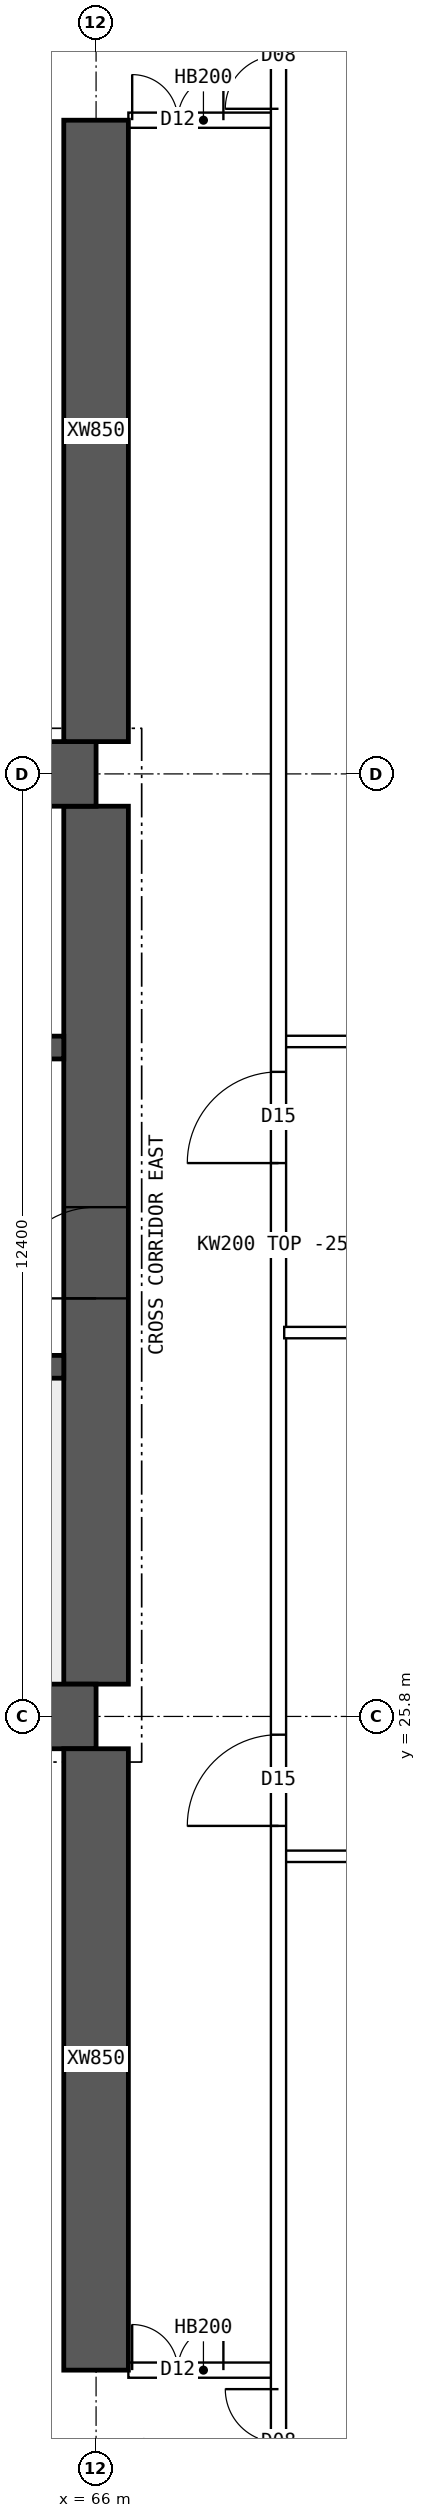
"""IFC4 building model, lengths in metres.
Left out: names, types, materials, properties, quantities, classifications, styles, units other than length and angle.
Written with IfcOpenShell. Run it as: python <this file> out.ifc"""

import sys

from ifc_helpers import new_model, si_unit, direction, frame, frame_2d, origin, place, context, subcontext, project, spatial, polyline, rectangle, outline, extrude, element, fill, save


model = new_model("IFC4")
c1 = context("Model", 3, precision=1e-05, world=origin(), true_north=direction((0.0, 1.0)))
c2 = subcontext(c1, "Body", "Model", "MODEL_VIEW")
j1 = project(units=[si_unit("LENGTHUNIT", "METRE"), si_unit("PLANEANGLEUNIT", "RADIAN")], contexts=[c1])
p1 = place(None, origin())
s1 = spatial("IfcSite", under=j1, at=p1, CompositionType="ELEMENT")
p2 = place(p1, origin())
s2 = spatial("IfcBuilding", under=s1, at=p2, CompositionType="ELEMENT")
p3 = place(p2, frame((0.0, 0.0, 171.1)))
s3 = spatial("IfcBuildingStorey", under=s2, at=p3, CompositionType="ELEMENT", Elevation=171.1)
for number, where, z_axis, x_axis in (
    (1, (18.0, 25.8, 0.0), (0.0, 0.0, 1.0), (1.0, 0.0, 0.0)),
    (2, (18.0, 38.2, 0.0), (0.0, 0.0, 1.0), (1.0, 0.0, 0.0)),
):
    element("IfcWall", number, at=place(p3, frame(where, z_axis=z_axis, x_axis=x_axis)), inside=s3, PredefinedType="SHEAR", context=c2, shape_type="SweptSolid", body=[
        extrude(rectangle(XDim=48.0, YDim=0.85, at=frame_2d((24.0, 0.0))), origin(), (0.0, 0.0, 1.0), 3.75),
    ])
p4 = place(p3, frame((66.0, 26.225, 0.0), z_axis=(0.0, 0.0, 1.0), x_axis=(0.0, 1.0, 0.0)))
e3 = element("IfcWall", 3, at=p4, inside=s3, PredefinedType="SHEAR", context=c2, shape_type="SweptSolid", body=[
    extrude(rectangle(XDim=11.55, YDim=0.85, at=frame_2d((5.775, 0.0))), origin(), (0.0, 0.0, 1.0), 3.75),
])
p5 = place(p4, frame((5.075, 0.0, 0.0)))
e4 = element("IfcOpeningElement", 4, at=p5, cuts=e3, PredefinedType="OPENING", context=c2, shape_type="SweptSolid", body=[
    extrude(rectangle(XDim=1.2, YDim=2.1, at=frame_2d((0.6, 1.05))), frame((0.0, 0.435, 0.0), z_axis=(0.0, -1.0, 0.0), x_axis=(1.0, 0.0, 0.0)), (0.0, 0.0, 1.0), 0.87),
])
p6 = place(p3, frame((18.425, 30.4, 0.0), z_axis=(0.0, 0.0, 1.0), x_axis=(1.0, 0.0, 0.0)))
e5 = element("IfcWall", 5, at=p6, inside=s3, PredefinedType="SHEAR", context=c2, shape_type="SweptSolid", body=[
    extrude(rectangle(XDim=47.15, YDim=0.3, at=frame_2d((23.575, 0.0))), origin(), (0.0, 0.0, 1.0), 3.75),
])
p7 = place(p6, frame((0.4, 0.0, 0.0)))
e6 = element("IfcOpeningElement", 6, at=p7, cuts=e5, PredefinedType="OPENING", context=c2, shape_type="SweptSolid", body=[
    extrude(rectangle(XDim=1.0, YDim=2.1, at=frame_2d((0.5, 1.05))), frame((0.0, 0.16, 0.0), z_axis=(0.0, -1.0, 0.0), x_axis=(1.0, 0.0, 0.0)), (0.0, 0.0, 1.0), 0.32),
])
p8 = place(p6, frame((45.75, 0.0, 0.0)))
e7 = element("IfcOpeningElement", 7, at=p8, cuts=e5, PredefinedType="OPENING", context=c2, shape_type="SweptSolid", body=[
    extrude(rectangle(XDim=1.0, YDim=2.1, at=frame_2d((0.5, 1.05))), frame((0.0, 0.16, 0.0), z_axis=(0.0, -1.0, 0.0), x_axis=(1.0, 0.0, 0.0)), (0.0, 0.0, 1.0), 0.32),
])
p9 = place(p6, frame((8.325, 0.0, 0.0)))
e8 = element("IfcOpeningElement", 8, at=p9, cuts=e5, PredefinedType="OPENING", context=c2, shape_type="SweptSolid", body=[
    extrude(rectangle(XDim=1.1, YDim=2.1, at=frame_2d((0.55, 1.05))), frame((0.0, 0.16, 0.0), z_axis=(0.0, -1.0, 0.0), x_axis=(1.0, 0.0, 0.0)), (0.0, 0.0, 1.0), 0.32),
])
p10 = place(p6, frame((10.925, 0.0, 0.0)))
e9 = element("IfcOpeningElement", 9, at=p10, cuts=e5, PredefinedType="OPENING", context=c2, shape_type="SweptSolid", body=[
    extrude(rectangle(XDim=1.1, YDim=2.1, at=frame_2d((0.55, 1.05))), frame((0.0, 0.16, 0.0), z_axis=(0.0, -1.0, 0.0), x_axis=(1.0, 0.0, 0.0)), (0.0, 0.0, 1.0), 0.32),
])
p11 = place(p6, frame((13.525, 0.0, 0.0)))
e10 = element("IfcOpeningElement", 10, at=p11, cuts=e5, PredefinedType="OPENING", context=c2, shape_type="SweptSolid", body=[
    extrude(rectangle(XDim=1.1, YDim=2.1, at=frame_2d((0.55, 1.05))), frame((0.0, 0.16, 0.0), z_axis=(0.0, -1.0, 0.0), x_axis=(1.0, 0.0, 0.0)), (0.0, 0.0, 1.0), 0.32),
])
p12 = place(p6, frame((16.125, 0.0, 0.0)))
e11 = element("IfcOpeningElement", 11, at=p12, cuts=e5, PredefinedType="OPENING", context=c2, shape_type="SweptSolid", body=[
    extrude(rectangle(XDim=1.1, YDim=2.1, at=frame_2d((0.55, 1.05))), frame((0.0, 0.16, 0.0), z_axis=(0.0, -1.0, 0.0), x_axis=(1.0, 0.0, 0.0)), (0.0, 0.0, 1.0), 0.32),
])
p13 = place(p6, frame((18.9, 0.0, 0.0)))
e12 = element("IfcOpeningElement", 12, at=p13, cuts=e5, PredefinedType="OPENING", context=c2, shape_type="SweptSolid", body=[
    extrude(rectangle(XDim=0.9, YDim=2.1, at=frame_2d((0.45, 1.05))), frame((0.0, 0.16, 0.0), z_axis=(0.0, -1.0, 0.0), x_axis=(1.0, 0.0, 0.0)), (0.0, 0.0, 1.0), 0.32),
])
p14 = place(p6, frame((30.192, 0.0, 0.0)))
e13 = element("IfcOpeningElement", 13, at=p14, cuts=e5, PredefinedType="OPENING", context=c2, shape_type="SweptSolid", body=[
    extrude(rectangle(XDim=1.1, YDim=2.1, at=frame_2d((0.55, 1.05))), frame((0.0, 0.16, 0.0), z_axis=(0.0, -1.0, 0.0), x_axis=(1.0, 0.0, 0.0)), (0.0, 0.0, 1.0), 0.32),
])
p15 = place(p6, frame((33.725, 0.0, 0.0)))
e14 = element("IfcOpeningElement", 14, at=p15, cuts=e5, PredefinedType="OPENING", context=c2, shape_type="SweptSolid", body=[
    extrude(rectangle(XDim=1.1, YDim=2.1, at=frame_2d((0.55, 1.05))), frame((0.0, 0.16, 0.0), z_axis=(0.0, -1.0, 0.0), x_axis=(1.0, 0.0, 0.0)), (0.0, 0.0, 1.0), 0.32),
])
p16 = place(p6, frame((37.258, 0.0, 0.0)))
e15 = element("IfcOpeningElement", 15, at=p16, cuts=e5, PredefinedType="OPENING", context=c2, shape_type="SweptSolid", body=[
    extrude(rectangle(XDim=1.1, YDim=2.1, at=frame_2d((0.55, 1.05))), frame((0.0, 0.16, 0.0), z_axis=(0.0, -1.0, 0.0), x_axis=(1.0, 0.0, 0.0)), (0.0, 0.0, 1.0), 0.32),
])
p17 = place(p3, frame((18.425, 34.6, 0.0), z_axis=(0.0, 0.0, 1.0), x_axis=(1.0, 0.0, 0.0)))
e16 = element("IfcWall", 16, at=p17, inside=s3, PredefinedType="SHEAR", context=c2, shape_type="SweptSolid", body=[
    extrude(rectangle(XDim=47.15, YDim=0.3, at=frame_2d((23.575, 0.0))), origin(), (0.0, 0.0, 1.0), 3.75),
])
p18 = place(p17, frame((0.9, 0.0, 0.0)))
e17 = element("IfcOpeningElement", 17, at=p18, cuts=e16, PredefinedType="OPENING", context=c2, shape_type="SweptSolid", body=[
    extrude(rectangle(XDim=1.1, YDim=2.1, at=frame_2d((0.55, 1.05))), frame((0.0, 0.16, 0.0), z_axis=(0.0, -1.0, 0.0), x_axis=(1.0, 0.0, 0.0)), (0.0, 0.0, 1.0), 0.32),
])
p19 = place(p17, frame((45.15, 0.0, 0.0)))
e18 = element("IfcOpeningElement", 18, at=p19, cuts=e16, PredefinedType="OPENING", context=c2, shape_type="SweptSolid", body=[
    extrude(rectangle(XDim=1.1, YDim=2.1, at=frame_2d((0.55, 1.05))), frame((0.0, 0.16, 0.0), z_axis=(0.0, -1.0, 0.0), x_axis=(1.0, 0.0, 0.0)), (0.0, 0.0, 1.0), 0.32),
])
p20 = place(p17, frame((4.175, 0.0, 0.0)))
e19 = element("IfcOpeningElement", 19, at=p20, cuts=e16, PredefinedType="OPENING", context=c2, shape_type="SweptSolid", body=[
    extrude(rectangle(XDim=0.9, YDim=2.1, at=frame_2d((0.45, 1.05))), frame((0.0, 0.16, 0.0), z_axis=(0.0, -1.0, 0.0), x_axis=(1.0, 0.0, 0.0)), (0.0, 0.0, 1.0), 0.32),
])
p21 = place(p17, frame((42.075, 0.0, 0.0)))
e20 = element("IfcOpeningElement", 20, at=p21, cuts=e16, PredefinedType="OPENING", context=c2, shape_type="SweptSolid", body=[
    extrude(rectangle(XDim=0.9, YDim=2.1, at=frame_2d((0.45, 1.05))), frame((0.0, 0.16, 0.0), z_axis=(0.0, -1.0, 0.0), x_axis=(1.0, 0.0, 0.0)), (0.0, 0.0, 1.0), 0.32),
])
p22 = place(p17, frame((8.95, 0.0, 0.0)))
e21 = element("IfcOpeningElement", 21, at=p22, cuts=e16, PredefinedType="OPENING", context=c2, shape_type="SweptSolid", body=[
    extrude(rectangle(XDim=0.9, YDim=2.1, at=frame_2d((0.45, 1.05))), frame((0.0, 0.16, 0.0), z_axis=(0.0, -1.0, 0.0), x_axis=(1.0, 0.0, 0.0)), (0.0, 0.0, 1.0), 0.32),
])
p23 = place(p17, frame((12.924, 0.0, 0.0)))
e22 = element("IfcOpeningElement", 22, at=p23, cuts=e16, PredefinedType="OPENING", context=c2, shape_type="SweptSolid", body=[
    extrude(rectangle(XDim=0.9, YDim=2.1, at=frame_2d((0.45, 1.05))), frame((0.0, 0.16, 0.0), z_axis=(0.0, -1.0, 0.0), x_axis=(1.0, 0.0, 0.0)), (0.0, 0.0, 1.0), 0.32),
])
p24 = place(p17, frame((16.571, 0.0, 0.0)))
e23 = element("IfcOpeningElement", 23, at=p24, cuts=e16, PredefinedType="OPENING", context=c2, shape_type="SweptSolid", body=[
    extrude(rectangle(XDim=0.9, YDim=2.1, at=frame_2d((0.45, 1.05))), frame((0.0, 0.16, 0.0), z_axis=(0.0, -1.0, 0.0), x_axis=(1.0, 0.0, 0.0)), (0.0, 0.0, 1.0), 0.32),
])
p25 = place(p17, frame((20.33, 0.0, 0.0)))
e24 = element("IfcOpeningElement", 24, at=p25, cuts=e16, PredefinedType="OPENING", context=c2, shape_type="SweptSolid", body=[
    extrude(rectangle(XDim=0.9, YDim=2.1, at=frame_2d((0.45, 1.05))), frame((0.0, 0.16, 0.0), z_axis=(0.0, -1.0, 0.0), x_axis=(1.0, 0.0, 0.0)), (0.0, 0.0, 1.0), 0.32),
])
p26 = place(p17, frame((24.736, 0.0, 0.0)))
e25 = element("IfcOpeningElement", 25, at=p26, cuts=e16, PredefinedType="OPENING", context=c2, shape_type="SweptSolid", body=[
    extrude(rectangle(XDim=0.9, YDim=2.1, at=frame_2d((0.45, 1.05))), frame((0.0, 0.16, 0.0), z_axis=(0.0, -1.0, 0.0), x_axis=(1.0, 0.0, 0.0)), (0.0, 0.0, 1.0), 0.32),
])
p27 = place(p17, frame((27.533, 0.0, 0.0)))
e26 = element("IfcOpeningElement", 26, at=p27, cuts=e16, PredefinedType="OPENING", context=c2, shape_type="SweptSolid", body=[
    extrude(rectangle(XDim=0.9, YDim=2.1, at=frame_2d((0.45, 1.05))), frame((0.0, 0.16, 0.0), z_axis=(0.0, -1.0, 0.0), x_axis=(1.0, 0.0, 0.0)), (0.0, 0.0, 1.0), 0.32),
])
p28 = place(p17, frame((29.5, 0.0, 0.0)))
e27 = element("IfcOpeningElement", 27, at=p28, cuts=e16, PredefinedType="OPENING", context=c2, shape_type="SweptSolid", body=[
    extrude(rectangle(XDim=0.9, YDim=2.1, at=frame_2d((0.45, 1.05))), frame((0.0, 0.16, 0.0), z_axis=(0.0, -1.0, 0.0), x_axis=(1.0, 0.0, 0.0)), (0.0, 0.0, 1.0), 0.32),
])
p29 = place(p17, frame((31.932, 0.0, 0.0)))
e28 = element("IfcOpeningElement", 28, at=p29, cuts=e16, PredefinedType="OPENING", context=c2, shape_type="SweptSolid", body=[
    extrude(rectangle(XDim=0.9, YDim=2.1, at=frame_2d((0.45, 1.05))), frame((0.0, 0.16, 0.0), z_axis=(0.0, -1.0, 0.0), x_axis=(1.0, 0.0, 0.0)), (0.0, 0.0, 1.0), 0.32),
])
p30 = place(p17, frame((34.667, 0.0, 0.0)))
e29 = element("IfcOpeningElement", 29, at=p30, cuts=e16, PredefinedType="OPENING", context=c2, shape_type="SweptSolid", body=[
    extrude(rectangle(XDim=0.9, YDim=2.1, at=frame_2d((0.45, 1.05))), frame((0.0, 0.16, 0.0), z_axis=(0.0, -1.0, 0.0), x_axis=(1.0, 0.0, 0.0)), (0.0, 0.0, 1.0), 0.32),
])
p31 = place(p17, frame((37.707, 0.0, 0.0)))
e30 = element("IfcOpeningElement", 30, at=p31, cuts=e16, PredefinedType="OPENING", context=c2, shape_type="SweptSolid", body=[
    extrude(rectangle(XDim=0.9, YDim=2.1, at=frame_2d((0.45, 1.05))), frame((0.0, 0.16, 0.0), z_axis=(0.0, -1.0, 0.0), x_axis=(1.0, 0.0, 0.0)), (0.0, 0.0, 1.0), 0.32),
])
for number, where, z_axis, x_axis in (
    (31, (66.0, 17.2, 0.0), (0.0, 0.0, 1.0), (0.0, 1.0, 0.0)),
    (32, (66.0, 38.625, 0.0), (0.0, 0.0, 1.0), (0.0, 1.0, 0.0)),
):
    element("IfcWall", number, at=place(p3, frame(where, z_axis=z_axis, x_axis=x_axis)), inside=s3, PredefinedType="SHEAR", context=c2, shape_type="SweptSolid", body=[
        extrude(rectangle(XDim=8.175, YDim=0.85, at=frame_2d((4.087, 0.0))), origin(), (0.0, 0.0, 1.0), 3.75),
    ])
p32 = place(p3, frame((66.425, 17.2, 0.0), z_axis=(0.0, 0.0, 1.0), x_axis=(1.0, 0.0, 0.0)))
e33 = element("IfcWall", 33, at=p32, inside=s3, PredefinedType="SOLIDWALL", context=c2, shape_type="SweptSolid", body=[
    extrude(rectangle(XDim=1.975, YDim=0.2, at=frame_2d((0.987, 0.0))), origin(), (0.0, 0.0, 1.0), 3.5),
])
p33 = place(p32, frame((0.05, 0.0, 0.0)))
e34 = element("IfcOpeningElement", 34, at=p33, cuts=e33, PredefinedType="OPENING", context=c2, shape_type="SweptSolid", body=[
    extrude(rectangle(XDim=1.2, YDim=2.1, at=frame_2d((0.6, 1.05))), frame((0.0, 0.11, 0.0), z_axis=(0.0, -1.0, 0.0), x_axis=(1.0, 0.0, 0.0)), (0.0, 0.0, 1.0), 0.22),
])
p34 = place(p3, frame((66.425, 46.8, 0.0), z_axis=(0.0, 0.0, 1.0), x_axis=(1.0, 0.0, 0.0)))
e35 = element("IfcWall", 35, at=p34, inside=s3, PredefinedType="SOLIDWALL", context=c2, shape_type="SweptSolid", body=[
    extrude(rectangle(XDim=1.975, YDim=0.2, at=frame_2d((0.987, 0.0))), origin(), (0.0, 0.0, 1.0), 3.5),
])
p35 = place(p34, frame((0.05, 0.0, 0.0)))
e36 = element("IfcOpeningElement", 36, at=p35, cuts=e35, PredefinedType="OPENING", context=c2, shape_type="SweptSolid", body=[
    extrude(rectangle(XDim=1.2, YDim=2.1, at=frame_2d((0.6, 1.05))), frame((0.0, 0.11, 0.0), z_axis=(0.0, -1.0, 0.0), x_axis=(1.0, 0.0, 0.0)), (0.0, 0.0, 1.0), 0.22),
])
p36 = place(p3, frame((68.475, 30.85, 0.0), z_axis=(0.0, 0.0, 1.0), x_axis=(1.0, 0.0, 0.0)))
e37 = element("IfcWall", 37, at=p36, inside=s3, PredefinedType="PARTITIONING", context=c2, shape_type="SweptSolid", body=[
    extrude(outline(polyline([(0.0, 0.0), (6.82, 0.0), (6.82, 3.5), (3.827, 3.5), (3.825, 3.05), (3.227, 3.05), (3.225, 3.5), (0.0, 3.5), (0.0, 0.0)])), frame((0.0, 0.075, 0.0), z_axis=(0.0, -1.0, 0.0), x_axis=(1.0, 0.0, 0.0)), (0.0, 0.0, 1.0), 0.15),
])
p37 = place(p3, frame((68.4, 10.446, 0.0), z_axis=(0.0, 0.0, 1.0), x_axis=(0.0, 1.0, 0.0)))
e38 = element("IfcWall", 38, at=p37, inside=s3, PredefinedType="SOLIDWALL", context=c2, shape_type="SweptSolid", body=[
    extrude(rectangle(XDim=43.107, YDim=0.2, at=frame_2d((21.554, 0.0))), origin(), (0.0, 0.0, 1.0), 3.5),
])
p38 = place(p37, frame((13.914, 0.0, 0.0)))
e39 = element("IfcOpeningElement", 39, at=p38, cuts=e38, PredefinedType="OPENING", context=c2, shape_type="SweptSolid", body=[
    extrude(rectangle(XDim=1.2, YDim=2.1, at=frame_2d((0.6, 1.05))), frame((0.0, 0.11, 0.0), z_axis=(0.0, -1.0, 0.0), x_axis=(1.0, 0.0, 0.0)), (0.0, 0.0, 1.0), 0.22),
])
p39 = place(p37, frame((22.634, 0.0, 0.0)))
e40 = element("IfcOpeningElement", 40, at=p39, cuts=e38, PredefinedType="OPENING", context=c2, shape_type="SweptSolid", body=[
    extrude(rectangle(XDim=1.2, YDim=2.1, at=frame_2d((0.6, 1.05))), frame((0.0, 0.11, 0.0), z_axis=(0.0, -1.0, 0.0), x_axis=(1.0, 0.0, 0.0)), (0.0, 0.0, 1.0), 0.22),
])
p40 = place(p37, frame((5.104, 0.0, 0.0)))
e41 = element("IfcOpeningElement", 41, at=p40, cuts=e38, PredefinedType="OPENING", context=c2, shape_type="SweptSolid", body=[
    extrude(rectangle(XDim=1.4, YDim=2.1, at=frame_2d((0.7, 1.05))), frame((0.0, 0.11, 0.0), z_axis=(0.0, -1.0, 0.0), x_axis=(1.0, 0.0, 0.0)), (0.0, 0.0, 1.0), 0.22),
])
p41 = place(p37, frame((36.504, 0.0, 0.0)))
e42 = element("IfcOpeningElement", 42, at=p41, cuts=e38, PredefinedType="OPENING", context=c2, shape_type="SweptSolid", body=[
    extrude(rectangle(XDim=1.4, YDim=2.1, at=frame_2d((0.7, 1.05))), frame((0.0, 0.11, 0.0), z_axis=(0.0, -1.0, 0.0), x_axis=(1.0, 0.0, 0.0)), (0.0, 0.0, 1.0), 0.22),
])
p42 = place(p3, frame((68.475, 23.96, 0.0), z_axis=(0.0, 0.0, 1.0), x_axis=(1.0, 0.0, 0.0)))
e43 = element("IfcWall", 43, at=p42, inside=s3, PredefinedType="PARTITIONING", context=c2, shape_type="SweptSolid", body=[
    extrude(rectangle(XDim=6.82, YDim=0.15, at=frame_2d((3.41, 0.0))), origin(), (0.0, 0.0, 1.0), 3.5),
])
p43 = place(p3, frame((68.475, 34.68, 0.0), z_axis=(0.0, 0.0, 1.0), x_axis=(1.0, 0.0, 0.0)))
e44 = element("IfcWall", 44, at=p43, inside=s3, PredefinedType="PARTITIONING", context=c2, shape_type="SweptSolid", body=[
    extrude(outline(polyline([(0.0, 0.0), (6.82, 0.0), (6.82, 3.5), (3.827, 3.5), (3.825, 3.05), (3.227, 3.05), (3.225, 3.5), (0.0, 3.5), (0.0, 0.0)])), frame((0.0, 0.075, 0.0), z_axis=(0.0, -1.0, 0.0), x_axis=(1.0, 0.0, 0.0)), (0.0, 0.0, 1.0), 0.15),
])
p44 = place(p5, origin())
e45 = element("IfcDoor", 45, at=p44, inside=s3, OperationType="SINGLE_SWING_LEFT", PredefinedType="DOOR", context=c2, shape_type="SweptSolid", body=[
    extrude(rectangle(XDim=1.2, YDim=2.1, at=frame_2d((0.6, 1.05))), frame((0.0, 0.025, 0.0), z_axis=(0.0, -1.0, 0.0), x_axis=(1.0, 0.0, 0.0)), (0.0, 0.0, 1.0), 0.05),
])
fill(e4, e45)
p45 = place(p33, origin())
e46 = element("IfcDoor", 46, at=p45, inside=s3, OperationType="DOUBLE_DOOR_SINGLE_SWING", PredefinedType="DOOR", context=c2, shape_type="SweptSolid", body=[
    extrude(rectangle(XDim=1.2, YDim=2.1, at=frame_2d((0.6, 1.05))), frame((0.0, 0.025, 0.0), z_axis=(0.0, -1.0, 0.0), x_axis=(1.0, 0.0, 0.0)), (0.0, 0.0, 1.0), 0.05),
])
fill(e34, e46)
p46 = place(p35, origin())
e47 = element("IfcDoor", 47, at=p46, inside=s3, OperationType="DOUBLE_DOOR_SINGLE_SWING", PredefinedType="DOOR", context=c2, shape_type="SweptSolid", body=[
    extrude(rectangle(XDim=1.2, YDim=2.1, at=frame_2d((0.6, 1.05))), frame((0.0, 0.025, 0.0), z_axis=(0.0, -1.0, 0.0), x_axis=(1.0, 0.0, 0.0)), (0.0, 0.0, 1.0), 0.05),
])
fill(e36, e47)
p47 = place(p38, origin())
e48 = element("IfcDoor", 48, at=p47, inside=s3, OperationType="SINGLE_SWING_LEFT", PredefinedType="DOOR", context=c2, shape_type="SweptSolid", body=[
    extrude(rectangle(XDim=1.2, YDim=2.1, at=frame_2d((0.6, 1.05))), frame((0.0, 0.025, 0.0), z_axis=(0.0, -1.0, 0.0), x_axis=(1.0, 0.0, 0.0)), (0.0, 0.0, 1.0), 0.05),
])
fill(e39, e48)
p48 = place(p39, origin())
e49 = element("IfcDoor", 49, at=p48, inside=s3, OperationType="SINGLE_SWING_LEFT", PredefinedType="DOOR", context=c2, shape_type="SweptSolid", body=[
    extrude(rectangle(XDim=1.2, YDim=2.1, at=frame_2d((0.6, 1.05))), frame((0.0, 0.025, 0.0), z_axis=(0.0, -1.0, 0.0), x_axis=(1.0, 0.0, 0.0)), (0.0, 0.0, 1.0), 0.05),
])
fill(e40, e49)
p49 = place(p40, origin())
e50 = element("IfcDoor", 50, at=p49, inside=s3, OperationType="DOUBLE_DOOR_SINGLE_SWING", PredefinedType="DOOR", context=c2, shape_type="SweptSolid", body=[
    extrude(rectangle(XDim=1.4, YDim=2.1, at=frame_2d((0.7, 1.05))), frame((0.0, 0.025, 0.0), z_axis=(0.0, -1.0, 0.0), x_axis=(1.0, 0.0, 0.0)), (0.0, 0.0, 1.0), 0.05),
])
fill(e41, e50)
p50 = place(p41, origin())
e51 = element("IfcDoor", 51, at=p50, inside=s3, OperationType="DOUBLE_DOOR_SINGLE_SWING", PredefinedType="DOOR", context=c2, shape_type="SweptSolid", body=[
    extrude(rectangle(XDim=1.4, YDim=2.1, at=frame_2d((0.7, 1.05))), frame((0.0, 0.025, 0.0), z_axis=(0.0, -1.0, 0.0), x_axis=(1.0, 0.0, 0.0)), (0.0, 0.0, 1.0), 0.05),
])
fill(e42, e51)
save(model, sys.argv[1])
